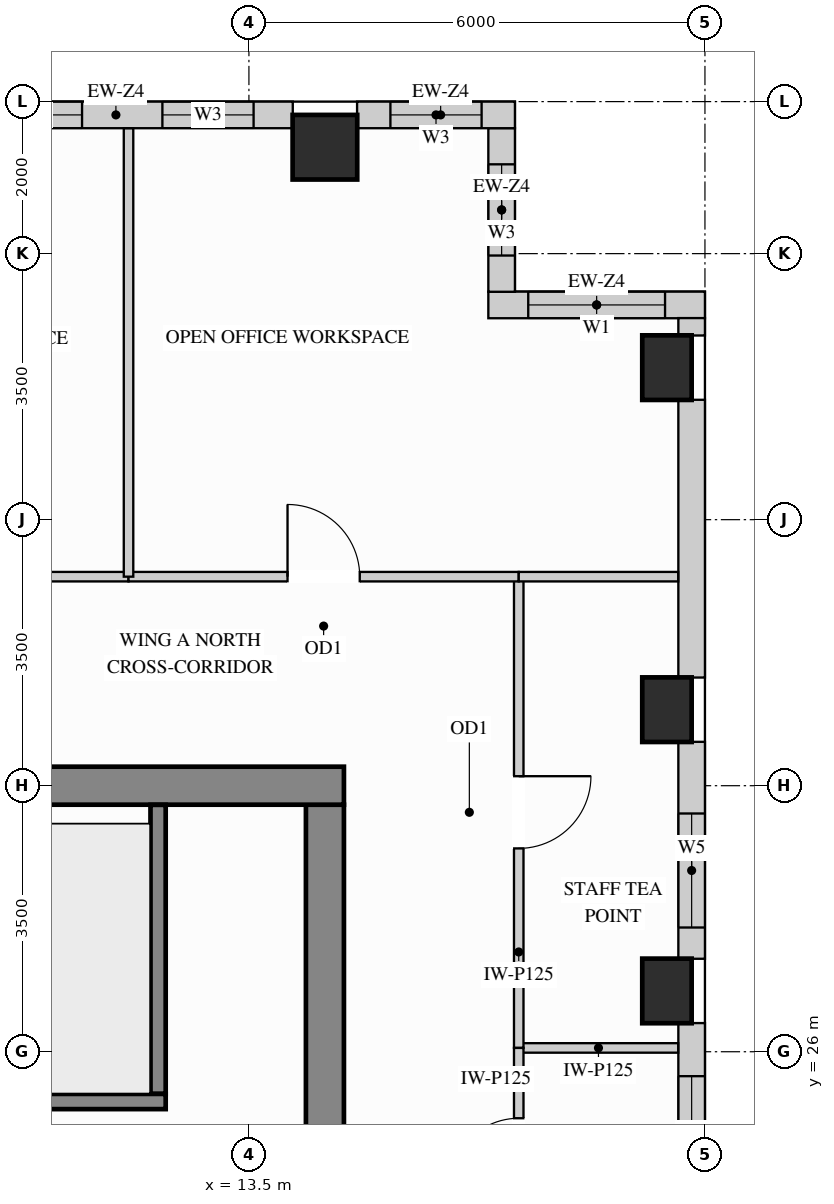
"""IFC4 building model, lengths in metres.
Left out: names, types, materials, properties, quantities, classifications, styles, units other than length and angle.
Written with IfcOpenShell. Run it as: python <this file> out.ifc"""

import sys

from ifc_helpers import new_model, si_unit, direction, frame, frame_2d, origin, origin_2d, place, context, subcontext, project, spatial, rectangle, extrude, source, transform, mapped, element, fill, save


model = new_model("IFC4")
c1 = context("Model", 3, precision=1e-05, world=origin(), true_north=direction((0.0, 1.0)))
c2 = subcontext(c1, "Body", "Model", "MODEL_VIEW")
j1 = project(units=[si_unit("LENGTHUNIT", "METRE"), si_unit("PLANEANGLEUNIT", "RADIAN")], contexts=[c1])
p1 = place(None, origin())
s1 = spatial("IfcSite", under=j1, at=p1, CompositionType="ELEMENT")
p2 = place(p1, origin())
s2 = spatial("IfcBuilding", under=s1, at=p2, CompositionType="ELEMENT")
p3 = place(p2, frame((0.0, 0.0, 216.0)))
s3 = spatial("IfcBuildingStorey", under=s2, at=p3, CompositionType="ELEMENT", Elevation=216.0)
m1 = source(origin(), c2, "Body", "SweptSolid", [
    extrude(rectangle(XDim=0.65, YDim=0.85, at=origin_2d()), origin(), (0.0, 0.0, 1.0), 3.4),
])
for number, where, z_axis, x_axis in (
    (1, (19.0, 26.8, 0.0), (0.0, 0.0, 1.0), (1.0, 0.0, 0.0)),
    (2, (19.0, 30.5, 0.0), (0.0, 0.0, 1.0), (1.0, 0.0, 0.0)),
    (3, (19.0, 35.0, 0.0), (0.0, 0.0, 1.0), (1.0, 0.0, 0.0)),
):
    element("IfcColumn", number, at=place(p3, frame(where, z_axis=z_axis, x_axis=x_axis)), inside=s3, PredefinedType="COLUMN", context=c2, shape_type="MappedRepresentation", body=[
        mapped(m1, transform((0.0, 0.0, 0.0), x_axis=(1.0, 0.0, 0.0), y_axis=(0.0, 1.0, 0.0), z_axis=(0.0, 0.0, 1.0))),
    ])
m2 = source(origin(), c2, "Body", "SweptSolid", [
    extrude(rectangle(XDim=0.85, YDim=0.85, at=origin_2d()), origin(), (0.0, 0.0, 1.0), 3.4),
])
p4 = place(p3, frame((14.5, 37.9, 0.0), z_axis=(0.0, 0.0, 1.0), x_axis=(1.0, 0.0, 0.0)))
e4 = element("IfcColumn", 4, at=p4, inside=s3, PredefinedType="COLUMN", context=c2, shape_type="MappedRepresentation", body=[
    mapped(m2, transform((0.0, 0.0, 0.0), x_axis=(1.0, 0.0, 0.0), y_axis=(0.0, 1.0, 0.0), z_axis=(0.0, 0.0, 1.0))),
])
m3 = source(origin(), c2, "Body", "SweptSolid", [
    extrude(rectangle(XDim=8.37, YDim=0.5, at=frame_2d((4.185, 0.0))), origin(), (0.0, 0.0, 1.0), 3.4),
])
p5 = place(p3, frame((14.5, 20.88, 0.0), z_axis=(0.0, 0.0, 1.0), x_axis=(0.0, 1.0, 0.0)))
e5 = element("IfcWall", 5, at=p5, inside=s3, PredefinedType="SHEAR", context=c2, shape_type="MappedRepresentation", body=[
    mapped(m3, transform((0.0, 0.0, 0.0), x_axis=(1.0, 0.0, 0.0), y_axis=(0.0, 1.0, 0.0), z_axis=(0.0, 0.0, 1.0))),
])
m4 = source(origin(), c2, "Body", "SweptSolid", [
    extrude(rectangle(XDim=10.5, YDim=0.5, at=frame_2d((5.25, 0.0))), origin(), (0.0, 0.0, 1.0), 3.4),
])
p6 = place(p3, frame((4.25, 29.5, 0.0), z_axis=(0.0, 0.0, 1.0), x_axis=(1.0, 0.0, 0.0)))
e6 = element("IfcWall", 6, at=p6, inside=s3, PredefinedType="SHEAR", context=c2, shape_type="MappedRepresentation", body=[
    mapped(m4, transform((0.0, 0.0, 0.0), x_axis=(1.0, 0.0, 0.0), y_axis=(0.0, 1.0, 0.0), z_axis=(0.0, 0.0, 1.0))),
])
p7 = place(p3, frame((19.5, 35.825, 0.0), z_axis=(0.0, 0.0, 1.0), x_axis=(-1.0, 0.0, 0.0)))
e7 = element("IfcWall", 7, at=p7, inside=s3, PredefinedType="SOLIDWALL", context=c2, shape_type="SweptSolid", body=[
    extrude(rectangle(XDim=2.85, YDim=0.35, at=frame_2d((1.425, 0.0))), origin(), (0.0, 0.0, 1.0), 3.385),
])
p8 = place(p7, frame((0.525, 0.0, 0.78)))
e8 = element("IfcOpeningElement", 8, at=p8, cuts=e7, PredefinedType="OPENING", context=c2, shape_type="SweptSolid", body=[
    extrude(rectangle(XDim=1.8, YDim=2.1, at=frame_2d((0.9, 1.05))), frame((0.0, 0.185, 0.0), z_axis=(0.0, -1.0, 0.0), x_axis=(1.0, 0.0, 0.0)), (0.0, 0.0, 1.0), 0.37),
])
p9 = place(p3, frame((16.825, 35.998, 0.0), z_axis=(0.0, 0.0, 1.0), x_axis=(0.0, 1.0, 0.0)))
e9 = element("IfcWall", 9, at=p9, inside=s3, PredefinedType="SOLIDWALL", context=c2, shape_type="SweptSolid", body=[
    extrude(rectangle(XDim=2.154, YDim=0.35, at=frame_2d((1.077, 0.0))), origin(), (0.0, 0.0, 1.0), 3.385),
])
p10 = place(p9, frame((0.477, 0.0, 0.78)))
e10 = element("IfcOpeningElement", 10, at=p10, cuts=e9, PredefinedType="OPENING", context=c2, shape_type="SweptSolid", body=[
    extrude(rectangle(XDim=1.2, YDim=2.1, at=frame_2d((0.6, 1.05))), frame((0.0, 0.185, 0.0), z_axis=(0.0, -1.0, 0.0), x_axis=(1.0, 0.0, 0.0)), (0.0, 0.0, 1.0), 0.37),
])
p11 = place(p3, frame((17.0, 38.325, 0.0), z_axis=(0.0, 0.0, 1.0), x_axis=(-1.0, 0.0, 0.0)))
e11 = element("IfcWall", 11, at=p11, inside=s3, PredefinedType="SOLIDWALL", context=c2, shape_type="SweptSolid", body=[
    extrude(rectangle(XDim=2.077, YDim=0.35, at=frame_2d((1.039, 0.0))), origin(), (0.0, 0.0, 1.0), 3.385),
])
p12 = place(p11, frame((0.438, 0.0, 0.78)))
e12 = element("IfcOpeningElement", 12, at=p12, cuts=e11, PredefinedType="OPENING", context=c2, shape_type="SweptSolid", body=[
    extrude(rectangle(XDim=1.2, YDim=2.1, at=frame_2d((0.6, 1.05))), frame((0.0, 0.185, 0.0), z_axis=(0.0, -1.0, 0.0), x_axis=(1.0, 0.0, 0.0)), (0.0, 0.0, 1.0), 0.37),
])
p13 = place(p3, frame((14.077, 38.325, 0.0), z_axis=(0.0, 0.0, 1.0), x_axis=(-1.0, 0.0, 0.0)))
e13 = element("IfcWall", 13, at=p13, inside=s3, PredefinedType="SOLIDWALL", context=c2, shape_type="SweptSolid", body=[
    extrude(rectangle(XDim=4.654, YDim=0.35, at=frame_2d((2.327, 0.0))), origin(), (0.0, 0.0, 1.0), 3.385),
])
p14 = place(p13, frame((0.515, 0.0, 0.78)))
e14 = element("IfcOpeningElement", 14, at=p14, cuts=e13, PredefinedType="OPENING", context=c2, shape_type="SweptSolid", body=[
    extrude(rectangle(XDim=1.2, YDim=2.1, at=frame_2d((0.6, 1.05))), frame((0.0, 0.185, 0.0), z_axis=(0.0, -1.0, 0.0), x_axis=(1.0, 0.0, 0.0)), (0.0, 0.0, 1.0), 0.37),
])
p15 = place(p13, frame((2.772, 0.0, 0.78)))
e15 = element("IfcOpeningElement", 15, at=p15, cuts=e13, PredefinedType="OPENING", context=c2, shape_type="SweptSolid", body=[
    extrude(rectangle(XDim=1.2, YDim=2.1, at=frame_2d((0.6, 1.05))), frame((0.0, 0.185, 0.0), z_axis=(0.0, -1.0, 0.0), x_axis=(1.0, 0.0, 0.0)), (0.0, 0.0, 1.0), 0.37),
])
p16 = place(p3, frame((19.325, 22.923, 0.0), z_axis=(0.0, 0.0, 1.0), x_axis=(0.0, 1.0, 0.0)))
e16 = element("IfcWall", 16, at=p16, inside=s3, PredefinedType="SOLIDWALL", context=c2, shape_type="SweptSolid", body=[
    extrude(rectangle(XDim=3.454, YDim=0.35, at=frame_2d((1.727, 0.0))), origin(), (0.0, 0.0, 1.0), 2.619),
])
p17 = place(p16, frame((1.256, 0.0, 0.78)))
e17 = element("IfcOpeningElement", 17, at=p17, cuts=e16, PredefinedType="OPENING", context=c2, shape_type="SweptSolid", body=[
    extrude(rectangle(XDim=1.5, YDim=1.659, at=frame_2d((0.75, 0.83))), frame((0.0, 0.185, 0.0), z_axis=(0.0, -1.0, 0.0), x_axis=(1.0, 0.0, 0.0)), (0.0, 0.0, 1.0), 0.37),
])
p18 = place(p3, frame((19.325, 27.223, 0.0), z_axis=(0.0, 0.0, 1.0), x_axis=(0.0, 1.0, 0.0)))
e18 = element("IfcWall", 18, at=p18, inside=s3, PredefinedType="SOLIDWALL", context=c2, shape_type="SweptSolid", body=[
    extrude(rectangle(XDim=2.854, YDim=0.35, at=frame_2d((1.427, 0.0))), origin(), (0.0, 0.0, 1.0), 2.619),
])
p19 = place(p18, frame((0.411, 0.0, 0.78)))
e19 = element("IfcOpeningElement", 19, at=p19, cuts=e18, PredefinedType="OPENING", context=c2, shape_type="SweptSolid", body=[
    extrude(rectangle(XDim=1.5, YDim=1.659, at=frame_2d((0.75, 0.83))), frame((0.0, 0.185, 0.0), z_axis=(0.0, -1.0, 0.0), x_axis=(1.0, 0.0, 0.0)), (0.0, 0.0, 1.0), 0.37),
])
m5 = source(origin(), c2, "Body", "SweptSolid", [
    extrude(rectangle(XDim=3.654, YDim=0.35, at=frame_2d((1.827, 0.0))), origin(), (0.0, 0.0, 1.0), 2.619),
])
p20 = place(p3, frame((19.325, 30.923, 0.0), z_axis=(0.0, 0.0, 1.0), x_axis=(0.0, 1.0, 0.0)))
e20 = element("IfcWall", 20, at=p20, inside=s3, PredefinedType="SOLIDWALL", context=c2, shape_type="MappedRepresentation", body=[
    mapped(m5, transform((0.0, 0.0, 0.0), x_axis=(1.0, 0.0, 0.0), y_axis=(0.0, 1.0, 0.0), z_axis=(0.0, 0.0, 1.0))),
])
m6 = source(origin(), c2, "Body", "SweptSolid", [
    extrude(rectangle(XDim=0.229, YDim=0.35, at=frame_2d((0.115, 0.0))), origin(), (0.0, 0.0, 1.0), 3.385),
])
p21 = place(p3, frame((19.325, 35.423, 0.0), z_axis=(0.0, 0.0, 1.0), x_axis=(0.0, 1.0, 0.0)))
e21 = element("IfcWall", 21, at=p21, inside=s3, PredefinedType="SOLIDWALL", context=c2, shape_type="MappedRepresentation", body=[
    mapped(m6, transform((0.0, 0.0, 0.0), x_axis=(1.0, 0.0, 0.0), y_axis=(0.0, 1.0, 0.0), z_axis=(0.0, 0.0, 1.0))),
])
m7 = source(origin(), c2, "Body", "SweptSolid", [
    extrude(rectangle(XDim=2.098, YDim=0.125, at=frame_2d((1.049, 0.0))), origin(), (0.0, 0.0, 1.0), 3.385),
])
p22 = place(p3, frame((17.05, 26.05, 0.0), z_axis=(0.0, 0.0, 1.0), x_axis=(1.0, 0.0, 0.0)))
e22 = element("IfcWall", 22, at=p22, inside=s3, PredefinedType="PARTITIONING", context=c2, shape_type="MappedRepresentation", body=[
    mapped(m7, transform((0.0, 0.0, 0.0), x_axis=(1.0, 0.0, 0.0), y_axis=(0.0, 1.0, 0.0), z_axis=(0.0, 0.0, 1.0))),
])
p23 = place(p3, frame((17.05, 26.05, 0.0), z_axis=(0.0, 0.0, 1.0), x_axis=(0.0, 1.0, 0.0)))
e23 = element("IfcWall", 23, at=p23, inside=s3, PredefinedType="PARTITIONING", context=c2, shape_type="SweptSolid", body=[
    extrude(rectangle(XDim=6.2, YDim=0.125, at=frame_2d((3.1, 0.0))), origin(), (0.0, 0.0, 1.0), 3.385),
])
p24 = place(p23, frame((2.625, 0.0, 0.0)))
e24 = element("IfcOpeningElement", 24, at=p24, cuts=e23, PredefinedType="OPENING", context=c2, shape_type="SweptSolid", body=[
    extrude(rectangle(XDim=0.95, YDim=2.15, at=frame_2d((0.475, 1.075))), frame((0.0, 0.073, 0.0), z_axis=(0.0, -1.0, 0.0), x_axis=(1.0, 0.0, 0.0)), (0.0, 0.0, 1.0), 0.145),
])
p25 = place(p3, frame((17.05, 23.35, 0.0), z_axis=(0.0, 0.0, 1.0), x_axis=(0.0, 1.0, 0.0)))
e25 = element("IfcWall", 25, at=p25, inside=s3, PredefinedType="PARTITIONING", context=c2, shape_type="SweptSolid", body=[
    extrude(rectangle(XDim=2.7, YDim=0.125, at=frame_2d((1.35, 0.0))), origin(), (0.0, 0.0, 1.0), 3.385),
])
p26 = place(p25, frame((0.875, 0.0, 0.0)))
e26 = element("IfcOpeningElement", 26, at=p26, cuts=e25, PredefinedType="OPENING", context=c2, shape_type="SweptSolid", body=[
    extrude(rectangle(XDim=0.9, YDim=2.15, at=frame_2d((0.45, 1.075))), frame((0.0, 0.073, 0.0), z_axis=(0.0, -1.0, 0.0), x_axis=(1.0, 0.0, 0.0)), (0.0, 0.0, 1.0), 0.145),
])
p27 = place(p3, frame((7.121, 32.25, 0.0), z_axis=(0.0, 0.0, 1.0), x_axis=(1.0, 0.0, 0.0)))
e27 = element("IfcWall", 27, at=p27, inside=s3, PredefinedType="PARTITIONING", context=c2, shape_type="SweptSolid", body=[
    extrude(rectangle(XDim=4.795, YDim=0.125, at=frame_2d((2.397, 0.0))), origin(), (0.0, 0.0, 1.0), 3.385),
])
p28 = place(p27, frame((1.923, 0.0, 0.0)))
e28 = element("IfcOpeningElement", 28, at=p28, cuts=e27, PredefinedType="OPENING", context=c2, shape_type="SweptSolid", body=[
    extrude(rectangle(XDim=0.95, YDim=2.15, at=frame_2d((0.475, 1.075))), frame((0.0, 0.073, 0.0), z_axis=(0.0, -1.0, 0.0), x_axis=(1.0, 0.0, 0.0)), (0.0, 0.0, 1.0), 0.145),
])
p29 = place(p3, frame((11.916, 32.25, 0.0), z_axis=(0.0, 0.0, 1.0), x_axis=(1.0, 0.0, 0.0)))
e29 = element("IfcWall", 29, at=p29, inside=s3, PredefinedType="PARTITIONING", context=c2, shape_type="SweptSolid", body=[
    extrude(rectangle(XDim=5.134, YDim=0.125, at=frame_2d((2.567, 0.0))), origin(), (0.0, 0.0, 1.0), 3.385),
])
p30 = place(p29, frame((2.092, 0.0, 0.0)))
e30 = element("IfcOpeningElement", 30, at=p30, cuts=e29, PredefinedType="OPENING", context=c2, shape_type="SweptSolid", body=[
    extrude(rectangle(XDim=0.95, YDim=2.15, at=frame_2d((0.475, 1.075))), frame((0.0, 0.073, 0.0), z_axis=(0.0, -1.0, 0.0), x_axis=(1.0, 0.0, 0.0)), (0.0, 0.0, 1.0), 0.145),
])
p31 = place(p3, frame((17.05, 32.25, 0.0), z_axis=(0.0, 0.0, 1.0), x_axis=(1.0, 0.0, 0.0)))
e31 = element("IfcWall", 31, at=p31, inside=s3, PredefinedType="PARTITIONING", context=c2, shape_type="MappedRepresentation", body=[
    mapped(m7, transform((0.0, 0.0, 0.0), x_axis=(1.0, 0.0, 0.0), y_axis=(0.0, 1.0, 0.0), z_axis=(0.0, 0.0, 1.0))),
])
m8 = source(origin(), c2, "Body", "SweptSolid", [
    extrude(rectangle(XDim=5.898, YDim=0.125, at=frame_2d((2.949, 0.0))), origin(), (0.0, 0.0, 1.0), 3.385),
])
p32 = place(p3, frame((11.916, 32.25, 0.0), z_axis=(0.0, 0.0, 1.0), x_axis=(0.0, 1.0, 0.0)))
e32 = element("IfcWall", 32, at=p32, inside=s3, PredefinedType="PARTITIONING", context=c2, shape_type="MappedRepresentation", body=[
    mapped(m8, transform((0.0, 0.0, 0.0), x_axis=(1.0, 0.0, 0.0), y_axis=(0.0, 1.0, 0.0), z_axis=(0.0, 0.0, 1.0))),
])
m9 = source(origin(), c2, "Body", "SweptSolid", [
    extrude(rectangle(XDim=3.803, YDim=0.2, at=frame_2d((1.901, 0.0))), origin(), (0.0, 0.0, 1.0), 3.4),
])
p33 = place(p3, frame((12.305, 25.445, 0.0), z_axis=(0.0, 0.0, 1.0), x_axis=(0.0, 1.0, 0.0)))
e33 = element("IfcWall", 33, at=p33, inside=s3, PredefinedType="SHEAR", context=c2, shape_type="MappedRepresentation", body=[
    mapped(m9, transform((0.0, 0.0, 0.0), x_axis=(1.0, 0.0, 0.0), y_axis=(0.0, 1.0, 0.0), z_axis=(0.0, 0.0, 1.0))),
])
p34 = place(p3, frame((4.752, 25.345, 0.0), z_axis=(0.0, 0.0, 1.0), x_axis=(1.0, 0.0, 0.0)))
e34 = element("IfcWall", 34, at=p34, inside=s3, PredefinedType="SHEAR", context=c2, shape_type="SweptSolid", body=[
    extrude(rectangle(XDim=7.653, YDim=0.2, at=frame_2d((3.827, 0.0))), origin(), (0.0, 0.0, 1.0), 3.4),
])
p35 = place(p34, frame((0.4, 0.0, 0.0)))
e35 = element("IfcOpeningElement", 35, at=p35, cuts=e34, PredefinedType="OPENING", context=c2, shape_type="SweptSolid", body=[
    extrude(rectangle(XDim=1.1, YDim=2.15, at=frame_2d((0.55, 1.075))), frame((0.0, 0.11, 0.0), z_axis=(0.0, -1.0, 0.0), x_axis=(1.0, 0.0, 0.0)), (0.0, 0.0, 1.0), 0.22),
])
m10 = source(origin(), c2, "Body", "SweptSolid", [
    extrude(rectangle(XDim=0.95, YDim=2.15, at=frame_2d((0.475, 1.075))), frame((0.0, 0.025, 0.0), z_axis=(0.0, -1.0, 0.0), x_axis=(1.0, 0.0, 0.0)), (0.0, 0.0, 1.0), 0.05),
])
p36 = place(p24, origin())
e36 = element("IfcDoor", 36, at=p36, inside=s3, OperationType="SINGLE_SWING_RIGHT", PredefinedType="DOOR", context=c2, shape_type="MappedRepresentation", body=[
    mapped(m10, transform((0.0, 0.0, 0.0), x_axis=(1.0, 0.0, 0.0), y_axis=(0.0, 1.0, 0.0), z_axis=(0.0, 0.0, 1.0))),
])
fill(e24, e36)
p37 = place(p30, origin())
e37 = element("IfcDoor", 37, at=p37, inside=s3, OperationType="SINGLE_SWING_LEFT", PredefinedType="DOOR", context=c2, shape_type="MappedRepresentation", body=[
    mapped(m10, transform((0.0, 0.0, 0.0), x_axis=(1.0, 0.0, 0.0), y_axis=(0.0, 1.0, 0.0), z_axis=(0.0, 0.0, 1.0))),
])
fill(e30, e37)
m11 = source(origin(), c2, "Body", "SweptSolid", [
    extrude(rectangle(XDim=0.9, YDim=2.15, at=frame_2d((0.45, 1.075))), frame((0.0, 0.025, 0.0), z_axis=(0.0, -1.0, 0.0), x_axis=(1.0, 0.0, 0.0)), (0.0, 0.0, 1.0), 0.05),
])
p38 = place(p26, origin())
e38 = element("IfcDoor", 38, at=p38, inside=s3, OperationType="SINGLE_SWING_LEFT", PredefinedType="DOOR", context=c2, shape_type="MappedRepresentation", body=[
    mapped(m11, transform((0.0, 0.0, 0.0), x_axis=(1.0, 0.0, 0.0), y_axis=(0.0, 1.0, 0.0), z_axis=(0.0, 0.0, 1.0))),
])
fill(e26, e38)
m12 = source(origin(), c2, "Body", "SweptSolid", [
    extrude(rectangle(XDim=1.8, YDim=2.1, at=frame_2d((0.9, 1.05))), frame((0.0, 0.03, 0.0), z_axis=(0.0, -1.0, 0.0), x_axis=(1.0, 0.0, 0.0)), (0.0, 0.0, 1.0), 0.06),
])
p39 = place(p8, origin())
e39 = element("IfcWindow", 39, at=p39, inside=s3, PartitioningType="SINGLE_PANEL", PredefinedType="WINDOW", context=c2, shape_type="MappedRepresentation", body=[
    mapped(m12, transform((0.0, 0.0, 0.0), x_axis=(1.0, 0.0, 0.0), y_axis=(0.0, 1.0, 0.0), z_axis=(0.0, 0.0, 1.0))),
])
fill(e8, e39)
m13 = source(origin(), c2, "Body", "SweptSolid", [
    extrude(rectangle(XDim=1.2, YDim=2.1, at=frame_2d((0.6, 1.05))), frame((0.0, 0.03, 0.0), z_axis=(0.0, -1.0, 0.0), x_axis=(1.0, 0.0, 0.0)), (0.0, 0.0, 1.0), 0.06),
])
p40 = place(p10, origin())
e40 = element("IfcWindow", 40, at=p40, inside=s3, PartitioningType="SINGLE_PANEL", PredefinedType="WINDOW", context=c2, shape_type="MappedRepresentation", body=[
    mapped(m13, transform((0.0, 0.0, 0.0), x_axis=(1.0, 0.0, 0.0), y_axis=(0.0, 1.0, 0.0), z_axis=(0.0, 0.0, 1.0))),
])
fill(e10, e40)
p41 = place(p12, origin())
e41 = element("IfcWindow", 41, at=p41, inside=s3, PartitioningType="SINGLE_PANEL", PredefinedType="WINDOW", context=c2, shape_type="MappedRepresentation", body=[
    mapped(m13, transform((0.0, 0.0, 0.0), x_axis=(1.0, 0.0, 0.0), y_axis=(0.0, 1.0, 0.0), z_axis=(0.0, 0.0, 1.0))),
])
fill(e12, e41)
p42 = place(p14, origin())
e42 = element("IfcWindow", 42, at=p42, inside=s3, PartitioningType="SINGLE_PANEL", PredefinedType="WINDOW", context=c2, shape_type="MappedRepresentation", body=[
    mapped(m13, transform((0.0, 0.0, 0.0), x_axis=(1.0, 0.0, 0.0), y_axis=(0.0, 1.0, 0.0), z_axis=(0.0, 0.0, 1.0))),
])
fill(e14, e42)
p43 = place(p15, origin())
e43 = element("IfcWindow", 43, at=p43, inside=s3, PartitioningType="SINGLE_PANEL", PredefinedType="WINDOW", context=c2, shape_type="MappedRepresentation", body=[
    mapped(m13, transform((0.0, 0.0, 0.0), x_axis=(1.0, 0.0, 0.0), y_axis=(0.0, 1.0, 0.0), z_axis=(0.0, 0.0, 1.0))),
])
fill(e15, e43)
m14 = source(origin(), c2, "Body", "SweptSolid", [
    extrude(rectangle(XDim=1.5, YDim=1.659, at=frame_2d((0.75, 0.83))), frame((0.0, 0.03, 0.0), z_axis=(0.0, -1.0, 0.0), x_axis=(1.0, 0.0, 0.0)), (0.0, 0.0, 1.0), 0.06),
])
p44 = place(p17, origin())
e44 = element("IfcWindow", 44, at=p44, inside=s3, PartitioningType="SINGLE_PANEL", PredefinedType="WINDOW", context=c2, shape_type="MappedRepresentation", body=[
    mapped(m14, transform((0.0, 0.0, 0.0), x_axis=(1.0, 0.0, 0.0), y_axis=(0.0, 1.0, 0.0), z_axis=(0.0, 0.0, 1.0))),
])
fill(e17, e44)
p45 = place(p19, origin())
e45 = element("IfcWindow", 45, at=p45, inside=s3, PartitioningType="SINGLE_PANEL", PredefinedType="WINDOW", context=c2, shape_type="MappedRepresentation", body=[
    mapped(m14, transform((0.0, 0.0, 0.0), x_axis=(1.0, 0.0, 0.0), y_axis=(0.0, 1.0, 0.0), z_axis=(0.0, 0.0, 1.0))),
])
fill(e19, e45)
save(model, sys.argv[1])
